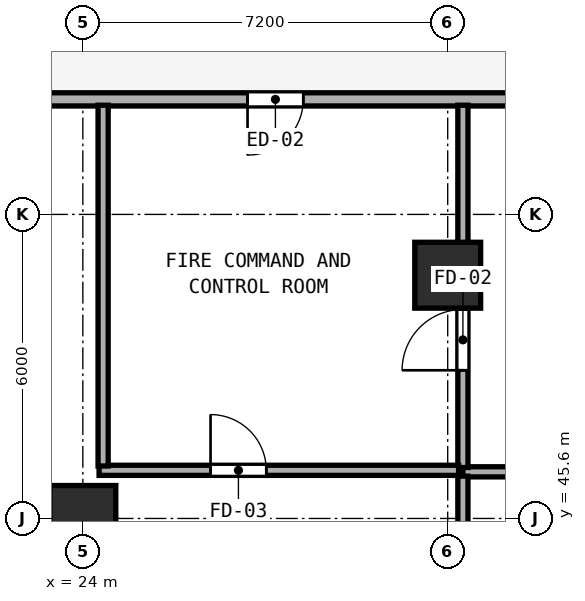
"""IFC4 building model, lengths in metres.
Left out: names, types, materials, properties, quantities, classifications, styles, units other than length and angle.
Written with IfcOpenShell. Run it as: python <this file> out.ifc"""

import sys

from ifc_helpers import new_model, si_unit, direction, frame, frame_2d, origin, origin_2d, place, context, subcontext, project, spatial, rectangle, hollow_rectangle, extrude, element, fill, save


model = new_model("IFC4")
c1 = context("Model", 3, precision=1e-05, world=origin(), true_north=direction((0.0, 1.0)))
c2 = subcontext(c1, "Body", "Model", "MODEL_VIEW")
j1 = project(units=[si_unit("LENGTHUNIT", "METRE"), si_unit("PLANEANGLEUNIT", "RADIAN")], contexts=[c1])
p1 = place(None, origin())
s1 = spatial("IfcSite", under=j1, at=p1, CompositionType="ELEMENT")
p2 = place(p1, origin())
s2 = spatial("IfcBuilding", under=s1, at=p2, CompositionType="ELEMENT")
p3 = place(p2, origin())
s3 = spatial("IfcBuildingStorey", under=s2, at=p3, CompositionType="ELEMENT", Elevation=0.0)
for number, where, z_axis, x_axis in (
    (1, (24.0, 45.6, 0.0), (0.0, 0.0, 1.0), (1.0, 0.0, 0.0)),
    (2, (31.2, 50.4, 0.0), (0.0, 0.0, 1.0), (1.0, 0.0, 0.0)),
):
    element("IfcColumn", number, at=place(p3, frame(where, z_axis=z_axis, x_axis=x_axis)), inside=s3, PredefinedType="COLUMN", context=c2, shape_type="SweptSolid", body=[
        extrude(hollow_rectangle(XDim=1.3, YDim=1.3, WallThickness=0.048, at=origin_2d()), origin(), (0.0, 0.0, 1.0), 5.4),
    ])
p4 = place(p3, frame((76.725, 53.87, 0.0), z_axis=(0.0, 0.0, 1.0), x_axis=(-1.0, 0.0, 0.0)))
e3 = element("IfcWall", 3, at=p4, inside=s3, PredefinedType="SOLIDWALL", context=c2, shape_type="SweptSolid", body=[
    extrude(rectangle(XDim=76.65, YDim=0.26, at=frame_2d((38.325, 0.0))), origin(), (0.0, 0.0, 1.0), 5.16),
])
p5 = place(p4, frame((42.425, 0.0, 0.0), z_axis=(0.0, 0.0, 1.0), x_axis=(-1.0, 0.0, 0.0)))
e4 = element("IfcOpeningElement", 4, at=p5, cuts=e3, PredefinedType="OPENING", context=c2, shape_type="SweptSolid", body=[
    extrude(rectangle(XDim=1.8, YDim=2.35, at=frame_2d((0.9, 1.175))), frame((0.0, 0.14, 0.0), z_axis=(0.0, -1.0, 0.0), x_axis=(1.0, 0.0, 0.0)), (0.0, 0.0, 1.0), 0.28),
])
p6 = place(p4, frame((36.025, 0.0, 0.0), z_axis=(0.0, 0.0, 1.0), x_axis=(-1.0, 0.0, 0.0)))
e5 = element("IfcOpeningElement", 5, at=p6, cuts=e3, PredefinedType="OPENING", context=c2, shape_type="SweptSolid", body=[
    extrude(rectangle(XDim=1.8, YDim=2.35, at=frame_2d((0.9, 1.175))), frame((0.0, 0.14, 0.0), z_axis=(0.0, -1.0, 0.0), x_axis=(1.0, 0.0, 0.0)), (0.0, 0.0, 1.0), 0.28),
])
p7 = place(p4, frame((49.475, 0.0, 0.0), z_axis=(0.0, 0.0, 1.0), x_axis=(-1.0, 0.0, 0.0)))
e6 = element("IfcOpeningElement", 6, at=p7, cuts=e3, PredefinedType="OPENING", context=c2, shape_type="SweptSolid", body=[
    extrude(rectangle(XDim=1.1, YDim=2.2, at=frame_2d((0.55, 1.1))), frame((0.0, 0.14, 0.0), z_axis=(0.0, -1.0, 0.0), x_axis=(1.0, 0.0, 0.0)), (0.0, 0.0, 1.0), 0.28),
])
p8 = place(p4, frame((6.825, 0.0, 0.0), z_axis=(0.0, 0.0, 1.0), x_axis=(-1.0, 0.0, 0.0)))
e7 = element("IfcOpeningElement", 7, at=p8, cuts=e3, PredefinedType="OPENING", context=c2, shape_type="SweptSolid", body=[
    extrude(rectangle(XDim=6.0, YDim=3.4, at=frame_2d((3.0, 1.7))), frame((0.0, 0.14, 0.0), z_axis=(0.0, -1.0, 0.0), x_axis=(1.0, 0.0, 0.0)), (0.0, 0.0, 1.0), 0.28),
])
p9 = place(p4, frame((72.225, 0.0, 0.0), z_axis=(0.0, 0.0, 1.0), x_axis=(-1.0, 0.0, 0.0)))
e8 = element("IfcOpeningElement", 8, at=p9, cuts=e3, PredefinedType="OPENING", context=c2, shape_type="SweptSolid", body=[
    extrude(rectangle(XDim=4.2, YDim=3.3, at=frame_2d((2.1, 1.65))), frame((0.0, 0.14, 0.0), z_axis=(0.0, -1.0, 0.0), x_axis=(1.0, 0.0, 0.0)), (0.0, 0.0, 1.0), 0.28),
])
p10 = place(p4, frame((20.825, 0.0, 0.0), z_axis=(0.0, 0.0, 1.0), x_axis=(-1.0, 0.0, 0.0)))
e9 = element("IfcOpeningElement", 9, at=p10, cuts=e3, PredefinedType="OPENING", context=c2, shape_type="SweptSolid", body=[
    extrude(rectangle(XDim=4.2, YDim=3.3, at=frame_2d((2.1, 1.65))), frame((0.0, 0.14, 0.0), z_axis=(0.0, -1.0, 0.0), x_axis=(1.0, 0.0, 0.0)), (0.0, 0.0, 1.0), 0.28),
])
p11 = place(p3, frame((31.5, 46.52, 0.0), z_axis=(0.0, 0.0, 1.0), x_axis=(1.0, 0.0, 0.0)))
e10 = element("IfcWall", 10, at=p11, inside=s3, PredefinedType="SOLIDWALL", context=c2, shape_type="SweptSolid", body=[
    extrude(rectangle(XDim=13.8, YDim=0.2, at=frame_2d((6.9, 0.0))), origin(), (0.0, 0.0, 1.0), 5.16),
])
p12 = place(p11, frame((2.5, 0.0, 0.0)))
e11 = element("IfcOpeningElement", 11, at=p12, cuts=e10, PredefinedType="OPENING", context=c2, shape_type="SweptSolid", body=[
    extrude(rectangle(XDim=1.4, YDim=2.2, at=frame_2d((0.7, 1.1))), frame((0.0, 0.11, 0.0), z_axis=(0.0, -1.0, 0.0), x_axis=(1.0, 0.0, 0.0)), (0.0, 0.0, 1.0), 0.22),
])
p13 = place(p11, frame((9.9, 0.0, 0.0)))
e12 = element("IfcOpeningElement", 12, at=p13, cuts=e10, PredefinedType="OPENING", context=c2, shape_type="SweptSolid", body=[
    extrude(rectangle(XDim=1.4, YDim=2.2, at=frame_2d((0.7, 1.1))), frame((0.0, 0.11, 0.0), z_axis=(0.0, -1.0, 0.0), x_axis=(1.0, 0.0, 0.0)), (0.0, 0.0, 1.0), 0.22),
])
p14 = place(p3, frame((31.5, 43.6, 0.0), z_axis=(0.0, 0.0, 1.0), x_axis=(0.0, 1.0, 0.0)))
e13 = element("IfcWall", 13, at=p14, inside=s3, PredefinedType="SOLIDWALL", context=c2, shape_type="SweptSolid", body=[
    extrude(rectangle(XDim=2.835, YDim=0.2, at=frame_2d((1.417, 0.0))), origin(), (0.0, 0.0, 1.0), 5.16),
])
p15 = place(p3, frame((31.5, 46.605, 0.0), z_axis=(0.0, 0.0, 1.0), x_axis=(0.0, 1.0, 0.0)))
e14 = element("IfcWall", 14, at=p15, inside=s3, PredefinedType="SOLIDWALL", context=c2, shape_type="SweptSolid", body=[
    extrude(rectangle(XDim=7.15, YDim=0.2, at=frame_2d((3.575, 0.0))), origin(), (0.0, 0.0, 1.0), 5.16),
])
p16 = place(p15, frame((1.919, 0.0, 0.0)))
e15 = element("IfcOpeningElement", 15, at=p16, cuts=e14, PredefinedType="OPENING", context=c2, shape_type="SweptSolid", body=[
    extrude(rectangle(XDim=1.2, YDim=2.15, at=frame_2d((0.6, 1.075))), frame((0.0, 0.11, 0.0), z_axis=(0.0, -1.0, 0.0), x_axis=(1.0, 0.0, 0.0)), (0.0, 0.0, 1.0), 0.22),
])
p17 = place(p3, frame((24.32, 46.55, 0.0), z_axis=(0.0, 0.0, 1.0), x_axis=(1.0, 0.0, 0.0)))
e16 = element("IfcWall", 16, at=p17, inside=s3, PredefinedType="SOLIDWALL", context=c2, shape_type="SweptSolid", body=[
    extrude(rectangle(XDim=7.095, YDim=0.2, at=frame_2d((3.547, 0.0))), origin(), (0.0, 0.0, 1.0), 5.16),
])
p18 = place(p17, frame((2.2, 0.0, 0.0)))
e17 = element("IfcOpeningElement", 17, at=p18, cuts=e16, PredefinedType="OPENING", context=c2, shape_type="SweptSolid", body=[
    extrude(rectangle(XDim=1.1, YDim=2.15, at=frame_2d((0.55, 1.075))), frame((0.0, 0.11, 0.0), z_axis=(0.0, -1.0, 0.0), x_axis=(1.0, 0.0, 0.0)), (0.0, 0.0, 1.0), 0.22),
])
p19 = place(p3, frame((24.4, 46.635, 0.0), z_axis=(0.0, 0.0, 1.0), x_axis=(0.0, 1.0, 0.0)))
e18 = element("IfcWall", 18, at=p19, inside=s3, PredefinedType="SOLIDWALL", context=c2, shape_type="SweptSolid", body=[
    extrude(rectangle(XDim=7.12, YDim=0.2, at=frame_2d((3.56, 0.0))), origin(), (0.0, 0.0, 1.0), 5.16),
])
p20 = place(p7, origin())
e19 = element("IfcDoor", 19, at=p20, inside=s3, OperationType="SINGLE_SWING_LEFT", PredefinedType="DOOR", context=c2, shape_type="SweptSolid", body=[
    extrude(rectangle(XDim=1.1, YDim=2.2, at=frame_2d((0.55, 1.1))), frame((0.0, 0.025, 0.0), z_axis=(0.0, -1.0, 0.0), x_axis=(1.0, 0.0, 0.0)), (0.0, 0.0, 1.0), 0.05),
])
fill(e6, e19)
p21 = place(p16, origin())
e20 = element("IfcDoor", 20, at=p21, inside=s3, OperationType="SINGLE_SWING_LEFT", PredefinedType="DOOR", context=c2, shape_type="SweptSolid", body=[
    extrude(rectangle(XDim=1.2, YDim=2.15, at=frame_2d((0.6, 1.075))), frame((0.0, 0.025, 0.0), z_axis=(0.0, -1.0, 0.0), x_axis=(1.0, 0.0, 0.0)), (0.0, 0.0, 1.0), 0.05),
])
fill(e15, e20)
p22 = place(p18, origin())
e21 = element("IfcDoor", 21, at=p22, inside=s3, OperationType="SINGLE_SWING_LEFT", PredefinedType="DOOR", context=c2, shape_type="SweptSolid", body=[
    extrude(rectangle(XDim=1.1, YDim=2.15, at=frame_2d((0.55, 1.075))), frame((0.0, 0.025, 0.0), z_axis=(0.0, -1.0, 0.0), x_axis=(1.0, 0.0, 0.0)), (0.0, 0.0, 1.0), 0.05),
])
fill(e17, e21)
save(model, sys.argv[1])
